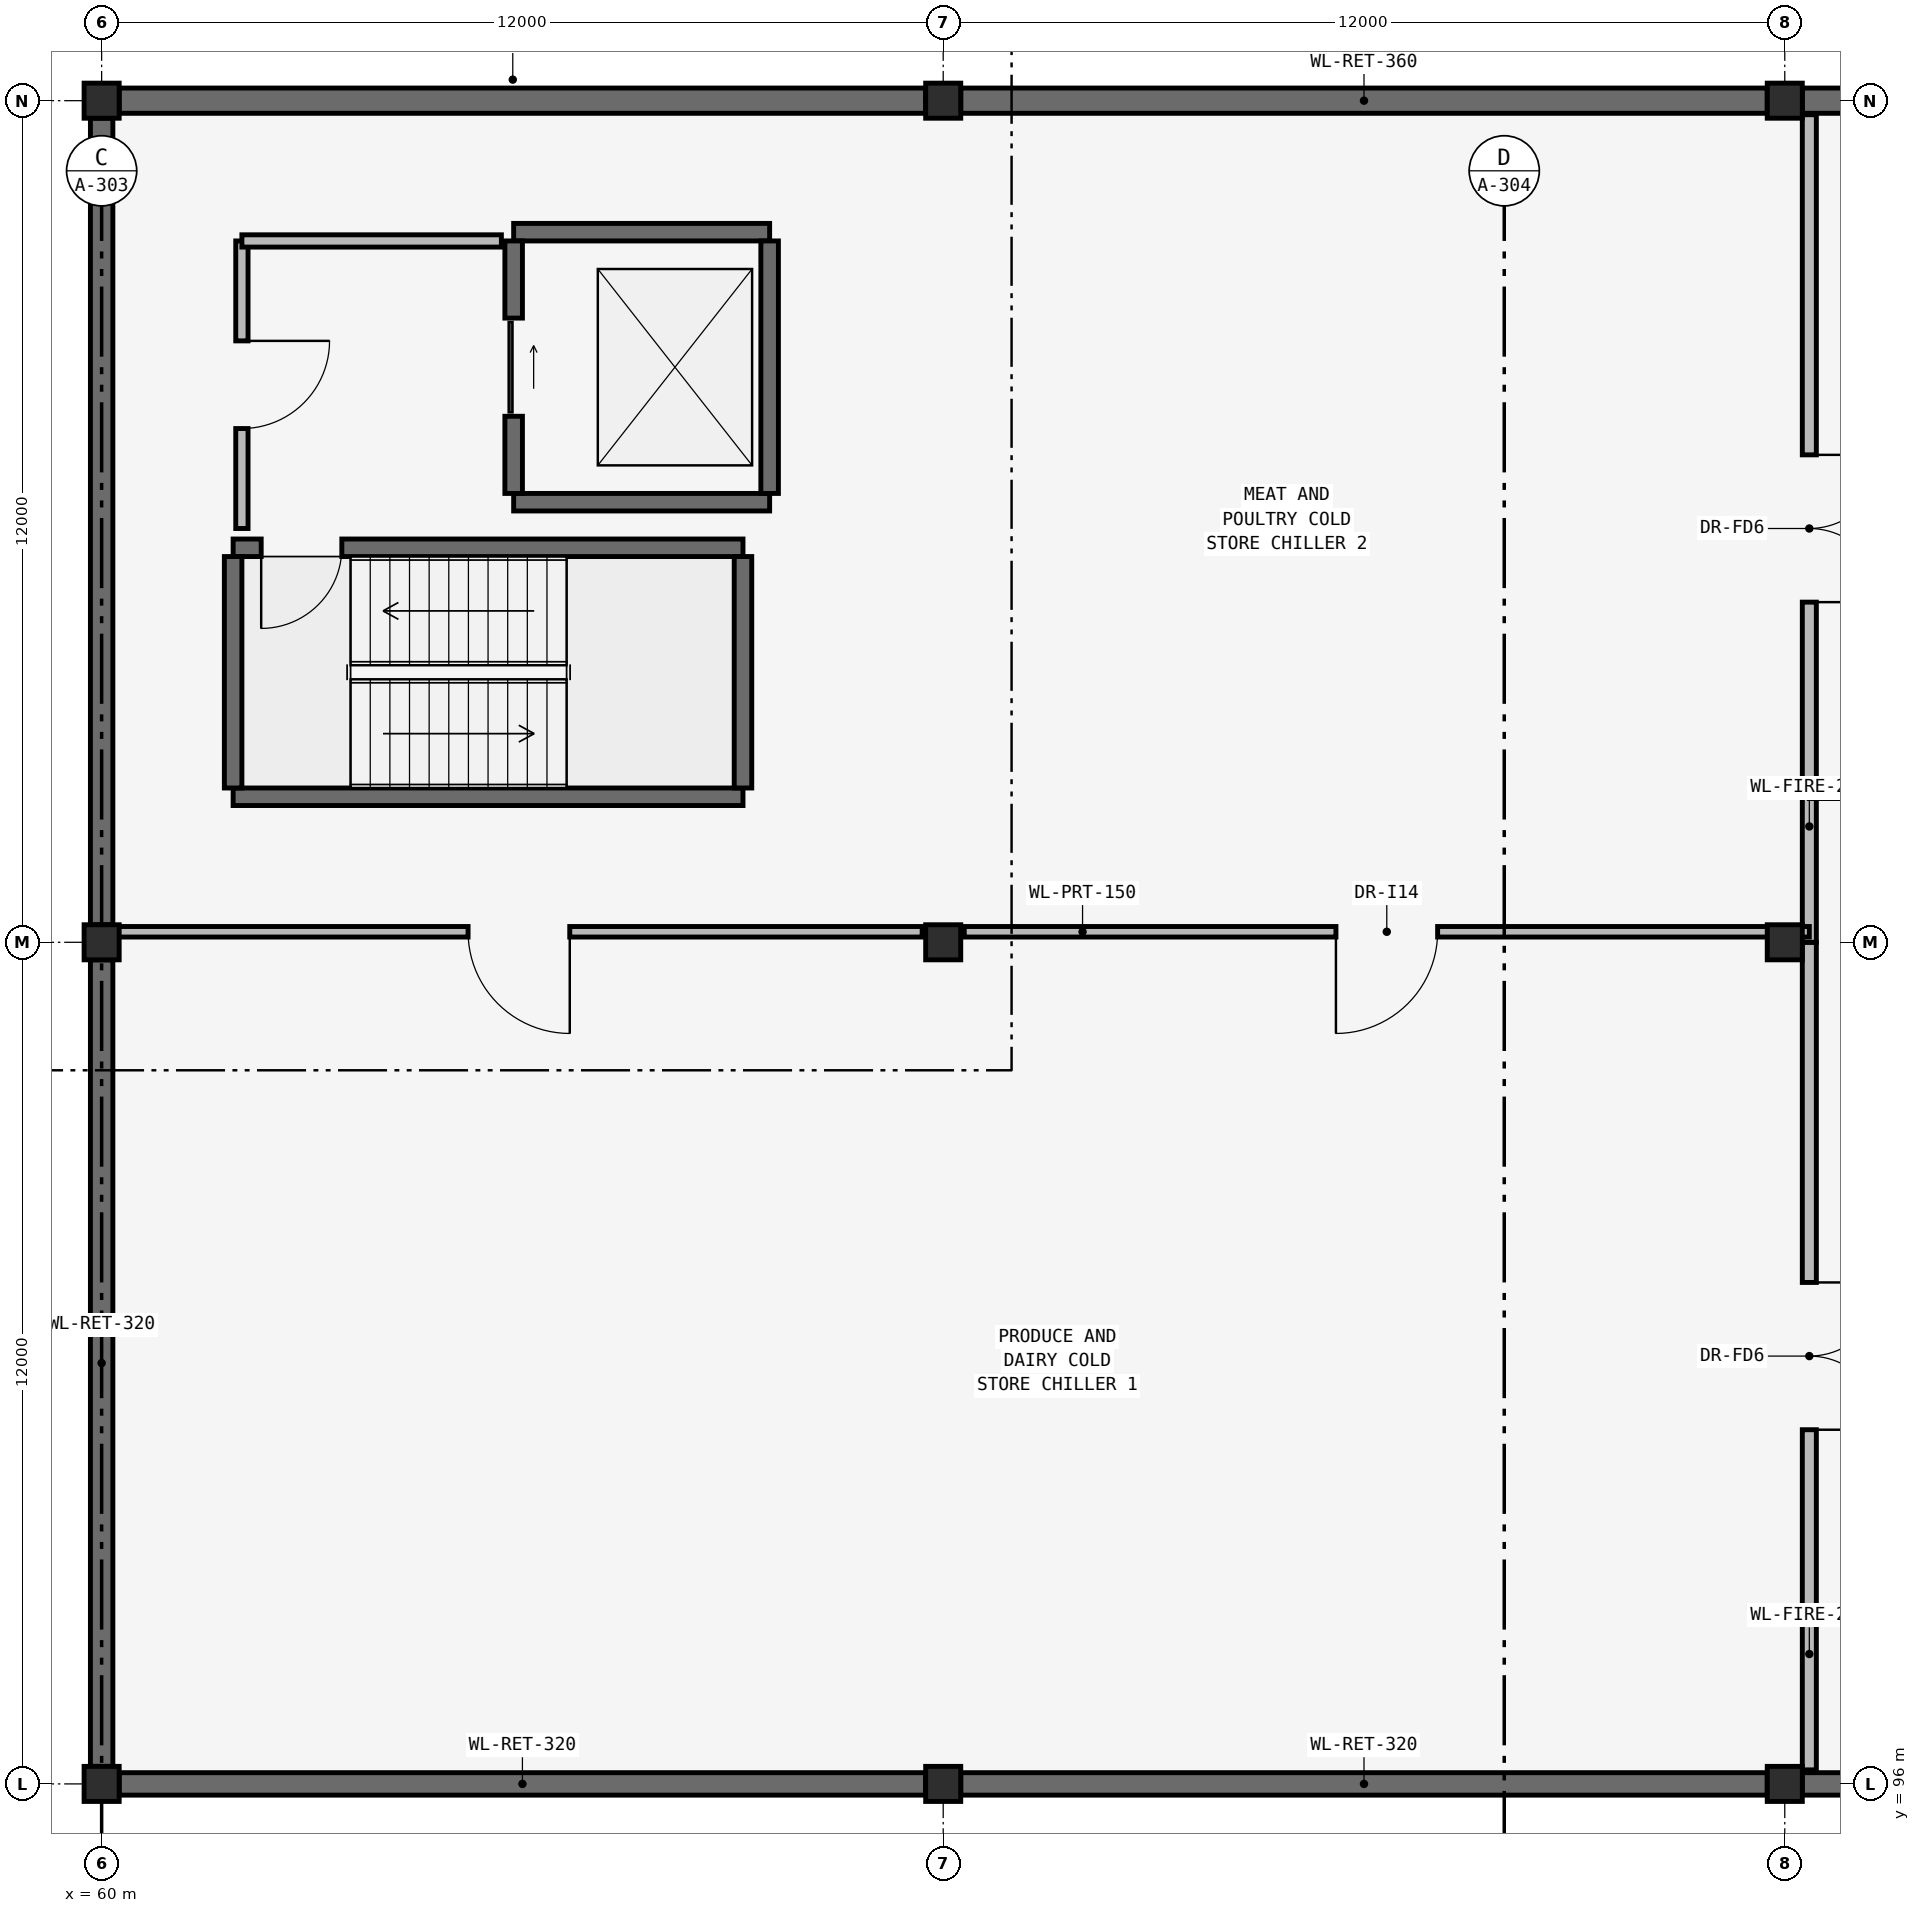
"""IFC4 building model, lengths in metres.
Left out: names, types, materials, properties, quantities, classifications, styles, units other than length and angle.
Written with IfcOpenShell. Run it as: python <this file> out.ifc"""

import sys

from ifc_helpers import new_model, si_unit, direction, frame, frame_2d, origin, origin_2d, place, context, subcontext, project, spatial, rectangle, extrude, element, fill, save


model = new_model("IFC4")
c1 = context("Model", 3, precision=1e-05, world=origin(), true_north=direction((0.0, 1.0)))
c2 = subcontext(c1, "Body", "Model", "MODEL_VIEW")
j1 = project(units=[si_unit("LENGTHUNIT", "METRE"), si_unit("PLANEANGLEUNIT", "RADIAN")], contexts=[c1])
p1 = place(None, origin())
s1 = spatial("IfcSite", under=j1, at=p1, CompositionType="ELEMENT")
p2 = place(p1, origin())
s2 = spatial("IfcBuilding", under=s1, at=p2, CompositionType="ELEMENT")
p3 = place(p2, frame((0.0, 0.0, -4.5)))
s3 = spatial("IfcBuildingStorey", under=s2, at=p3, CompositionType="ELEMENT", Elevation=-4.5)
for number, where, z_axis, x_axis in (
    (1, (60.0, 96.0, -0.35), (0.0, 0.0, 1.0), (1.0, 0.0, 0.0)),
    (2, (60.0, 108.0, -0.35), (0.0, 0.0, 1.0), (1.0, 0.0, 0.0)),
    (3, (60.0, 120.0, -0.35), (0.0, 0.0, 1.0), (1.0, 0.0, 0.0)),
    (4, (72.0, 96.0, -0.35), (0.0, 0.0, 1.0), (1.0, 0.0, 0.0)),
    (5, (72.0, 108.0, -0.35), (0.0, 0.0, 1.0), (1.0, 0.0, 0.0)),
    (6, (72.0, 120.0, -0.35), (0.0, 0.0, 1.0), (1.0, 0.0, 0.0)),
    (7, (84.0, 96.0, -0.35), (0.0, 0.0, 1.0), (1.0, 0.0, 0.0)),
    (8, (84.0, 108.0, -0.35), (0.0, 0.0, 1.0), (1.0, 0.0, 0.0)),
    (9, (84.0, 120.0, -0.35), (0.0, 0.0, 1.0), (1.0, 0.0, 0.0)),
):
    element("IfcColumn", number, at=place(p3, frame(where, z_axis=z_axis, x_axis=x_axis)), inside=s3, PredefinedType="COLUMN", context=c2, shape_type="SweptSolid", body=[
        extrude(rectangle(XDim=0.5, YDim=0.5, at=origin_2d()), origin(), (0.0, 0.0, 1.0), 4.85),
    ])
for number, where, z_axis, x_axis in (
    (10, (60.25, 120.0, 0.0), (0.0, 0.0, 1.0), (1.0, 0.0, 0.0)),
    (11, (72.25, 120.0, 0.0), (0.0, 0.0, 1.0), (1.0, 0.0, 0.0)),
    (12, (84.25, 120.0, 0.0), (0.0, 0.0, 1.0), (1.0, 0.0, 0.0)),
):
    element("IfcWall", number, at=place(p3, frame(where, z_axis=z_axis, x_axis=x_axis)), inside=s3, PredefinedType="USERDEFINED", context=c2, shape_type="SweptSolid", body=[
        extrude(rectangle(XDim=11.5, YDim=0.36, at=frame_2d((5.75, 0.0))), origin(), (0.0, 0.0, 1.0), 4.15),
    ])
for number, where, z_axis, x_axis in (
    (13, (60.0, 96.25, 0.0), (0.0, 0.0, 1.0), (0.0, 1.0, 0.0)),
    (14, (60.0, 108.25, 0.0), (0.0, 0.0, 1.0), (0.0, 1.0, 0.0)),
    (15, (60.25, 96.0, 0.0), (0.0, 0.0, 1.0), (1.0, 0.0, 0.0)),
    (16, (72.25, 96.0, 0.0), (0.0, 0.0, 1.0), (1.0, 0.0, 0.0)),
    (17, (84.25, 96.0, 0.0), (0.0, 0.0, 1.0), (1.0, 0.0, 0.0)),
):
    element("IfcWall", number, at=place(p3, frame(where, z_axis=z_axis, x_axis=x_axis)), inside=s3, PredefinedType="USERDEFINED", context=c2, shape_type="SweptSolid", body=[
        extrude(rectangle(XDim=11.5, YDim=0.32, at=frame_2d((5.75, 0.0))), origin(), (0.0, 0.0, 1.0), 4.15),
    ])
p4 = place(p3, frame((61.875, 110.075, 0.0), z_axis=(0.0, 0.0, 1.0), x_axis=(1.0, 0.0, 0.0)))
e18 = element("IfcWall", 18, at=p4, inside=s3, PredefinedType="SHEAR", context=c2, shape_type="SweptSolid", body=[
    extrude(rectangle(XDim=7.27, YDim=0.25, at=frame_2d((3.635, 0.0))), origin(), (0.0, 0.0, 1.0), 4.15),
])
p5 = place(p3, frame((61.875, 113.625, 0.0), z_axis=(0.0, 0.0, 1.0), x_axis=(1.0, 0.0, 0.0)))
e19 = element("IfcWall", 19, at=p5, inside=s3, PredefinedType="SHEAR", context=c2, shape_type="SweptSolid", body=[
    extrude(rectangle(XDim=7.27, YDim=0.25, at=frame_2d((3.635, 0.0))), origin(), (0.0, 0.0, 1.0), 4.15),
])
p6 = place(p5, frame((0.4, 0.0, 0.0)))
e20 = element("IfcOpeningElement", 20, at=p6, cuts=e19, PredefinedType="OPENING", context=c2, shape_type="SweptSolid", body=[
    extrude(rectangle(XDim=1.15, YDim=2.15, at=frame_2d((0.575, 1.075))), frame((0.0, 0.14, 0.0), z_axis=(0.0, -1.0, 0.0), x_axis=(1.0, 0.0, 0.0)), (0.0, 0.0, 1.0), 0.28),
])
for number, where, z_axis, x_axis in (
    (21, (61.875, 110.2, 0.0), (0.0, 0.0, 1.0), (0.0, 1.0, 0.0)),
    (22, (69.145, 110.2, 0.0), (0.0, 0.0, 1.0), (0.0, 1.0, 0.0)),
):
    element("IfcWall", number, at=place(p3, frame(where, z_axis=z_axis, x_axis=x_axis)), inside=s3, PredefinedType="SHEAR", context=c2, shape_type="SweptSolid", body=[
        extrude(rectangle(XDim=3.3, YDim=0.25, at=frame_2d((1.65, 0.0))), origin(), (0.0, 0.0, 1.0), 4.15),
    ])
for number, where, z_axis, x_axis in (
    (23, (65.875, 114.275, 0.0), (0.0, 0.0, 1.0), (1.0, 0.0, 0.0)),
    (24, (65.875, 118.125, 0.0), (0.0, 0.0, 1.0), (1.0, 0.0, 0.0)),
):
    element("IfcWall", number, at=place(p3, frame(where, z_axis=z_axis, x_axis=x_axis)), inside=s3, PredefinedType="SHEAR", context=c2, shape_type="SweptSolid", body=[
        extrude(rectangle(XDim=3.65, YDim=0.25, at=frame_2d((1.825, 0.0))), origin(), (0.0, 0.0, 1.0), 4.15),
    ])
p7 = place(p3, frame((69.525, 114.4, 0.0), z_axis=(0.0, 0.0, 1.0), x_axis=(0.0, 1.0, 0.0)))
e25 = element("IfcWall", 25, at=p7, inside=s3, PredefinedType="SHEAR", context=c2, shape_type="SweptSolid", body=[
    extrude(rectangle(XDim=3.6, YDim=0.25, at=frame_2d((1.8, 0.0))), origin(), (0.0, 0.0, 1.0), 4.15),
])
p8 = place(p3, frame((65.875, 114.4, 0.0), z_axis=(0.0, 0.0, 1.0), x_axis=(0.0, 1.0, 0.0)))
e26 = element("IfcWall", 26, at=p8, inside=s3, PredefinedType="SHEAR", context=c2, shape_type="SweptSolid", body=[
    extrude(rectangle(XDim=3.6, YDim=0.25, at=frame_2d((1.8, 0.0))), origin(), (0.0, 0.0, 1.0), 4.15),
])
p9 = place(p8, frame((1.1, 0.0, 0.0)))
e27 = element("IfcOpeningElement", 27, at=p9, cuts=e26, PredefinedType="OPENING", context=c2, shape_type="SweptSolid", body=[
    extrude(rectangle(XDim=1.4, YDim=2.2, at=frame_2d((0.7, 1.1))), frame((0.0, 0.14, 0.0), z_axis=(0.0, -1.0, 0.0), x_axis=(1.0, 0.0, 0.0)), (0.0, 0.0, 1.0), 0.28),
])
p10 = place(p3, frame((62.0, 113.9, 0.0), z_axis=(0.0, 0.0, 1.0), x_axis=(0.0, 1.0, 0.0)))
e28 = element("IfcWall", 28, at=p10, inside=s3, PredefinedType="PARTITIONING", context=c2, shape_type="SweptSolid", body=[
    extrude(rectangle(XDim=4.1, YDim=0.175, at=frame_2d((2.05, 0.0))), origin(), (0.0, 0.0, 1.0), 4.15),
])
p11 = place(p10, frame((1.425, 0.0, 0.0)))
e29 = element("IfcOpeningElement", 29, at=p11, cuts=e28, PredefinedType="OPENING", context=c2, shape_type="SweptSolid", body=[
    extrude(rectangle(XDim=1.25, YDim=2.2, at=frame_2d((0.625, 1.1))), frame((0.0, 0.103, 0.0), z_axis=(0.0, -1.0, 0.0), x_axis=(1.0, 0.0, 0.0)), (0.0, 0.0, 1.0), 0.205),
])
p12 = place(p3, frame((62.0, 118.0, 0.0), z_axis=(0.0, 0.0, 1.0), x_axis=(1.0, 0.0, 0.0)))
e30 = element("IfcWall", 30, at=p12, inside=s3, PredefinedType="PARTITIONING", context=c2, shape_type="SweptSolid", body=[
    extrude(rectangle(XDim=3.7, YDim=0.175, at=frame_2d((1.85, 0.0))), origin(), (0.0, 0.0, 1.0), 4.15),
])
p13 = place(p3, frame((84.35, 96.2, 0.0), z_axis=(0.0, 0.0, 1.0), x_axis=(0.0, 1.0, 0.0)))
e31 = element("IfcWall", 31, at=p13, inside=s3, PredefinedType="SOLIDWALL", context=c2, shape_type="SweptSolid", body=[
    extrude(rectangle(XDim=11.8, YDim=0.2, at=frame_2d((5.9, 0.0))), origin(), (0.0, 0.0, 1.0), 4.15),
])
p14 = place(p13, frame((4.85, 0.0, 0.0)))
e32 = element("IfcOpeningElement", 32, at=p14, cuts=e31, PredefinedType="OPENING", context=c2, shape_type="SweptSolid", body=[
    extrude(rectangle(XDim=2.1, YDim=2.35, at=frame_2d((1.05, 1.175))), frame((0.0, 0.115, 0.0), z_axis=(0.0, -1.0, 0.0), x_axis=(1.0, 0.0, 0.0)), (0.0, 0.0, 1.0), 0.23),
])
p15 = place(p3, frame((84.35, 108.0, 0.0), z_axis=(0.0, 0.0, 1.0), x_axis=(0.0, 1.0, 0.0)))
e33 = element("IfcWall", 33, at=p15, inside=s3, PredefinedType="SOLIDWALL", context=c2, shape_type="SweptSolid", body=[
    extrude(rectangle(XDim=11.8, YDim=0.2, at=frame_2d((5.9, 0.0))), origin(), (0.0, 0.0, 1.0), 4.15),
])
p16 = place(p15, frame((4.85, 0.0, 0.0)))
e34 = element("IfcOpeningElement", 34, at=p16, cuts=e33, PredefinedType="OPENING", context=c2, shape_type="SweptSolid", body=[
    extrude(rectangle(XDim=2.1, YDim=2.35, at=frame_2d((1.05, 1.175))), frame((0.0, 0.115, 0.0), z_axis=(0.0, -1.0, 0.0), x_axis=(1.0, 0.0, 0.0)), (0.0, 0.0, 1.0), 0.23),
])
p17 = place(p3, frame((60.2, 108.15, 0.0), z_axis=(0.0, 0.0, 1.0), x_axis=(1.0, 0.0, 0.0)))
e35 = element("IfcWall", 35, at=p17, inside=s3, PredefinedType="PARTITIONING", context=c2, shape_type="SweptSolid", body=[
    extrude(rectangle(XDim=11.5, YDim=0.15, at=frame_2d((5.75, 0.0))), origin(), (0.0, 0.0, 1.0), 3.52),
])
p18 = place(p17, frame((5.025, 0.0, 0.0)))
e36 = element("IfcOpeningElement", 36, at=p18, cuts=e35, PredefinedType="OPENING", context=c2, shape_type="SweptSolid", body=[
    extrude(rectangle(XDim=1.45, YDim=2.15, at=frame_2d((0.725, 1.075))), frame((0.0, 0.09, 0.0), z_axis=(0.0, -1.0, 0.0), x_axis=(1.0, 0.0, 0.0)), (0.0, 0.0, 1.0), 0.18),
])
p19 = place(p3, frame((72.3, 108.15, 0.0), z_axis=(0.0, 0.0, 1.0), x_axis=(1.0, 0.0, 0.0)))
e37 = element("IfcWall", 37, at=p19, inside=s3, PredefinedType="PARTITIONING", context=c2, shape_type="SweptSolid", body=[
    extrude(rectangle(XDim=12.05, YDim=0.15, at=frame_2d((6.025, 0.0))), origin(), (0.0, 0.0, 1.0), 3.52),
])
p20 = place(p19, frame((5.3, 0.0, 0.0)))
e38 = element("IfcOpeningElement", 38, at=p20, cuts=e37, PredefinedType="OPENING", context=c2, shape_type="SweptSolid", body=[
    extrude(rectangle(XDim=1.45, YDim=2.15, at=frame_2d((0.725, 1.075))), frame((0.0, 0.09, 0.0), z_axis=(0.0, -1.0, 0.0), x_axis=(1.0, 0.0, 0.0)), (0.0, 0.0, 1.0), 0.18),
])
p21 = place(p3, frame((84.35, 110.15, 0.0), z_axis=(0.0, 0.0, 1.0), x_axis=(1.0, 0.0, 0.0)))
e39 = element("IfcWall", 39, at=p21, inside=s3, PredefinedType="SOLIDWALL", context=c2, shape_type="SweptSolid", body=[
    extrude(rectangle(XDim=25.55, YDim=0.2, at=frame_2d((12.775, 0.0))), origin(), (0.0, 0.0, 1.0), 4.15),
])
p22 = place(p21, frame((12.15, 0.0, 0.0)))
e40 = element("IfcOpeningElement", 40, at=p22, cuts=e39, PredefinedType="OPENING", context=c2, shape_type="SweptSolid", body=[
    extrude(rectangle(XDim=1.25, YDim=2.2, at=frame_2d((0.625, 1.1))), frame((0.0, 0.115, 0.0), z_axis=(0.0, -1.0, 0.0), x_axis=(1.0, 0.0, 0.0)), (0.0, 0.0, 1.0), 0.23),
])
p23 = place(p6, frame((1.15, 0.0, 0.0), z_axis=(0.0, 0.0, 1.0), x_axis=(-1.0, 0.0, 0.0)))
e41 = element("IfcDoor", 41, at=p23, inside=s3, OperationType="SINGLE_SWING_LEFT", PredefinedType="DOOR", context=c2, shape_type="SweptSolid", body=[
    extrude(rectangle(XDim=1.15, YDim=2.15, at=frame_2d((0.575, 1.075))), frame((0.0, 0.025, 0.0), z_axis=(0.0, -1.0, 0.0), x_axis=(1.0, 0.0, 0.0)), (0.0, 0.0, 1.0), 0.05),
])
fill(e20, e41)
p24 = place(p9, origin())
e42 = element("IfcDoor", 42, at=p24, inside=s3, OperationType="SLIDING_TO_RIGHT", PredefinedType="DOOR", context=c2, shape_type="SweptSolid", body=[
    extrude(rectangle(XDim=1.4, YDim=2.2, at=frame_2d((0.7, 1.1))), frame((0.0, 0.025, 0.0), z_axis=(0.0, -1.0, 0.0), x_axis=(1.0, 0.0, 0.0)), (0.0, 0.0, 1.0), 0.05),
])
fill(e27, e42)
p25 = place(p11, frame((1.25, 0.0, 0.0), z_axis=(0.0, 0.0, 1.0), x_axis=(-1.0, 0.0, 0.0)))
e43 = element("IfcDoor", 43, at=p25, inside=s3, OperationType="SINGLE_SWING_RIGHT", PredefinedType="DOOR", context=c2, shape_type="SweptSolid", body=[
    extrude(rectangle(XDim=1.25, YDim=2.2, at=frame_2d((0.625, 1.1))), frame((0.0, 0.025, 0.0), z_axis=(0.0, -1.0, 0.0), x_axis=(1.0, 0.0, 0.0)), (0.0, 0.0, 1.0), 0.05),
])
fill(e29, e43)
p26 = place(p14, origin())
e44 = element("IfcDoor", 44, at=p26, inside=s3, OperationType="DOUBLE_DOOR_SINGLE_SWING", PredefinedType="DOOR", context=c2, shape_type="SweptSolid", body=[
    extrude(rectangle(XDim=2.1, YDim=2.35, at=frame_2d((1.05, 1.175))), frame((0.0, 0.025, 0.0), z_axis=(0.0, -1.0, 0.0), x_axis=(1.0, 0.0, 0.0)), (0.0, 0.0, 1.0), 0.05),
])
fill(e32, e44)
p27 = place(p16, origin())
e45 = element("IfcDoor", 45, at=p27, inside=s3, OperationType="DOUBLE_DOOR_SINGLE_SWING", PredefinedType="DOOR", context=c2, shape_type="SweptSolid", body=[
    extrude(rectangle(XDim=2.1, YDim=2.35, at=frame_2d((1.05, 1.175))), frame((0.0, 0.025, 0.0), z_axis=(0.0, -1.0, 0.0), x_axis=(1.0, 0.0, 0.0)), (0.0, 0.0, 1.0), 0.05),
])
fill(e34, e45)
p28 = place(p18, origin())
e46 = element("IfcDoor", 46, at=p28, inside=s3, OperationType="SINGLE_SWING_RIGHT", PredefinedType="DOOR", context=c2, shape_type="SweptSolid", body=[
    extrude(rectangle(XDim=1.45, YDim=2.15, at=frame_2d((0.725, 1.075))), frame((0.0, 0.025, 0.0), z_axis=(0.0, -1.0, 0.0), x_axis=(1.0, 0.0, 0.0)), (0.0, 0.0, 1.0), 0.05),
])
fill(e36, e46)
p29 = place(p20, origin())
e47 = element("IfcDoor", 47, at=p29, inside=s3, OperationType="SINGLE_SWING_LEFT", PredefinedType="DOOR", context=c2, shape_type="SweptSolid", body=[
    extrude(rectangle(XDim=1.45, YDim=2.15, at=frame_2d((0.725, 1.075))), frame((0.0, 0.025, 0.0), z_axis=(0.0, -1.0, 0.0), x_axis=(1.0, 0.0, 0.0)), (0.0, 0.0, 1.0), 0.05),
])
fill(e38, e47)
save(model, sys.argv[1])
